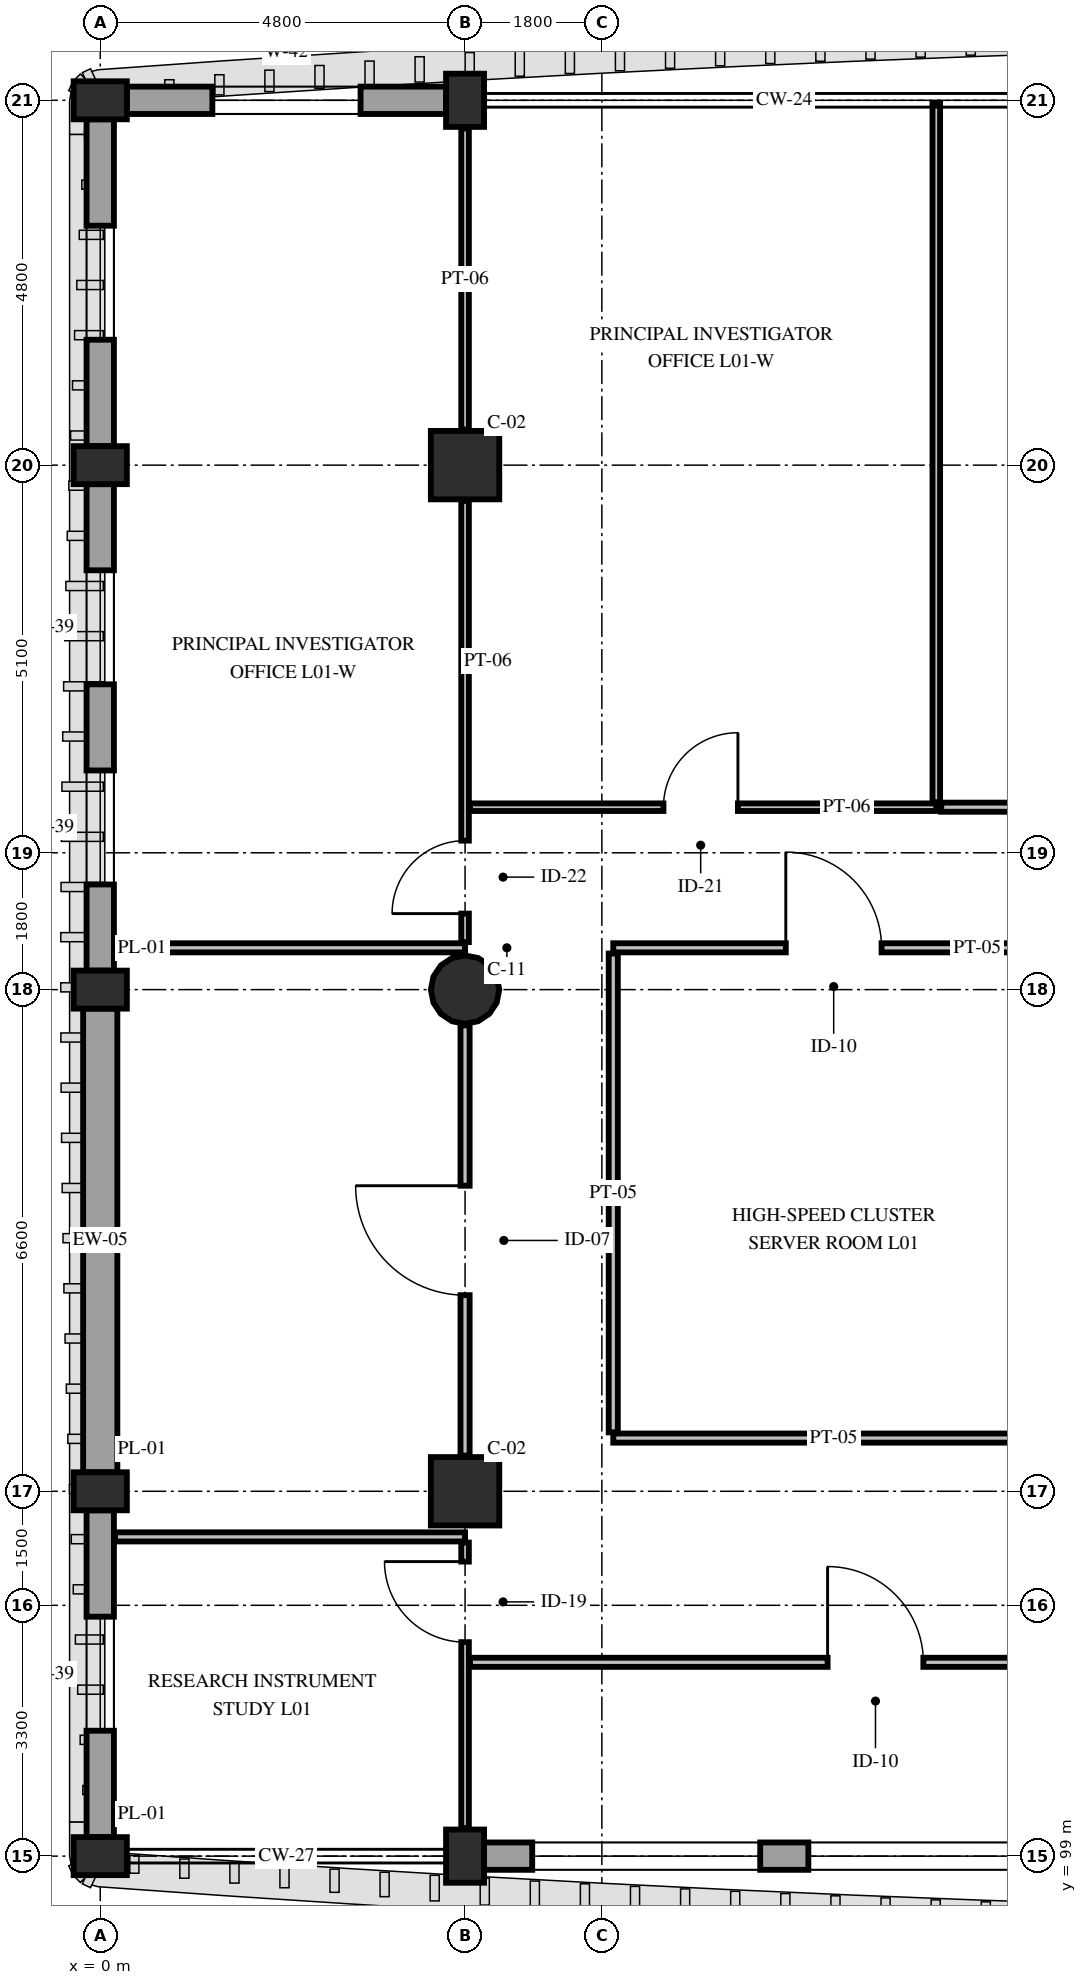
"""IFC4 building model, lengths in metres.
Left out: names, types, materials, properties, quantities, classifications, styles, units other than length and angle.
Written with IfcOpenShell. Run it as: python <this file> out.ifc"""

import sys

from ifc_helpers import new_model, si_unit, direction, frame, frame_2d, origin, origin_2d, place, context, subcontext, project, spatial, rectangle, circle, extrude, element, fill, save


model = new_model("IFC4")
c1 = context("Model", 3, precision=1e-05, world=origin(), true_north=direction((0.0, 1.0)))
c2 = subcontext(c1, "Body", "Model", "MODEL_VIEW")
j1 = project(units=[si_unit("LENGTHUNIT", "METRE"), si_unit("PLANEANGLEUNIT", "RADIAN")], contexts=[c1])
p1 = place(None, origin())
s1 = spatial("IfcSite", under=j1, at=p1, CompositionType="ELEMENT")
p2 = place(p1, origin())
s2 = spatial("IfcBuilding", under=s1, at=p2, CompositionType="ELEMENT")
p3 = place(p2, frame((0.0, 0.0, 5.4)))
s3 = spatial("IfcBuildingStorey", under=s2, at=p3, CompositionType="ELEMENT", Elevation=5.4)
for number, where, z_axis, x_axis in (
    (1, (0.0, 99.0, 0.0), (0.0, 0.0, 1.0), (0.0, 1.0, 0.0)),
    (2, (0.0, 103.8, 0.0), (0.0, 0.0, 1.0), (0.0, 1.0, 0.0)),
    (3, (0.0, 110.4, 0.0), (0.0, 0.0, 1.0), (0.0, 1.0, 0.0)),
    (4, (0.0, 117.3, 0.0), (0.0, 0.0, 1.0), (0.0, 1.0, 0.0)),
    (5, (0.0, 122.1, 0.0), (0.0, 0.0, 1.0), (0.0, 1.0, 0.0)),
    (6, (4.8, 99.0, 0.0), (0.0, 0.0, 1.0), (1.0, 0.0, 0.0)),
):
    element("IfcColumn", number, at=place(p3, frame(where, z_axis=z_axis, x_axis=x_axis)), inside=s3, PredefinedType="PILASTER", context=c2, shape_type="SweptSolid", body=[
        extrude(rectangle(XDim=0.5, YDim=0.7, at=origin_2d()), origin(), (0.0, 0.0, 1.0), 4.8),
    ])
p4 = place(p3, frame((4.8, 103.8, 0.0), z_axis=(0.0, 0.0, 1.0), x_axis=(1.0, 0.0, 0.0)))
e7 = element("IfcColumn", 7, at=p4, inside=s3, PredefinedType="COLUMN", context=c2, shape_type="SweptSolid", body=[
    extrude(rectangle(XDim=0.9, YDim=0.9, at=origin_2d()), origin(), (0.0, 0.0, 1.0), 4.8),
])
p5 = place(p3, frame((4.8, 110.4, 0.0), z_axis=(0.0, 0.0, 1.0), x_axis=(1.0, 0.0, 0.0)))
e8 = element("IfcColumn", 8, at=p5, inside=s3, PredefinedType="COLUMN", context=c2, shape_type="SweptSolid", body=[
    extrude(circle(Radius=0.45, at=origin_2d()), origin(), (0.0, 0.0, 1.0), 4.8),
])
p6 = place(p3, frame((4.8, 117.3, 0.0), z_axis=(0.0, 0.0, 1.0), x_axis=(1.0, 0.0, 0.0)))
e9 = element("IfcColumn", 9, at=p6, inside=s3, PredefinedType="COLUMN", context=c2, shape_type="SweptSolid", body=[
    extrude(rectangle(XDim=0.9, YDim=0.9, at=origin_2d()), origin(), (0.0, 0.0, 1.0), 4.8),
])
p7 = place(p3, frame((4.8, 122.1, 0.0), z_axis=(0.0, 0.0, 1.0), x_axis=(1.0, 0.0, 0.0)))
e10 = element("IfcColumn", 10, at=p7, inside=s3, PredefinedType="PILASTER", context=c2, shape_type="SweptSolid", body=[
    extrude(rectangle(XDim=0.5, YDim=0.7, at=origin_2d()), origin(), (0.0, 0.0, 1.0), 4.8),
])
p8 = place(p3, frame((0.0, 99.25, 0.0), z_axis=(0.0, 0.0, 1.0), x_axis=(0.0, 1.0, 0.0)))
e11 = element("IfcWall", 11, at=p8, inside=s3, PredefinedType="STANDARD", context=c2, shape_type="SweptSolid", body=[
    extrude(rectangle(XDim=4.3, YDim=0.36, at=frame_2d((2.15, 0.0))), origin(), (0.0, 0.0, 1.0), 3.95),
])
p9 = place(p8, frame((1.4, 0.0, 0.85)))
e12 = element("IfcOpeningElement", 12, at=p9, cuts=e11, PredefinedType="OPENING", context=c2, shape_type="SweptSolid", body=[
    extrude(rectangle(XDim=1.5, YDim=2.08, at=frame_2d((0.75, 1.04))), frame((0.0, 0.195, 0.0), z_axis=(0.0, -1.0, 0.0), x_axis=(1.0, 0.0, 0.0)), (0.0, 0.0, 1.0), 0.39),
])
p10 = place(p3, frame((0.0, 104.05, 0.0), z_axis=(0.0, 0.0, 1.0), x_axis=(0.0, 1.0, 0.0)))
e13 = element("IfcWall", 13, at=p10, inside=s3, PredefinedType="SOLIDWALL", context=c2, shape_type="SweptSolid", body=[
    extrude(rectangle(XDim=6.1, YDim=0.45, at=frame_2d((3.05, 0.0))), origin(), (0.0, 0.0, 1.0), 3.95),
])
p11 = place(p3, frame((0.0, 110.65, 0.0), z_axis=(0.0, 0.0, 1.0), x_axis=(0.0, 1.0, 0.0)))
e14 = element("IfcWall", 14, at=p11, inside=s3, PredefinedType="STANDARD", context=c2, shape_type="SweptSolid", body=[
    extrude(rectangle(XDim=6.4, YDim=0.36, at=frame_2d((3.2, 0.0))), origin(), (0.0, 0.0, 1.0), 3.95),
])
p12 = place(p11, frame((1.133, 0.0, 0.85)))
e15 = element("IfcOpeningElement", 15, at=p12, cuts=e14, PredefinedType="OPENING", context=c2, shape_type="SweptSolid", body=[
    extrude(rectangle(XDim=1.5, YDim=2.08, at=frame_2d((0.75, 1.04))), frame((0.0, 0.195, 0.0), z_axis=(0.0, -1.0, 0.0), x_axis=(1.0, 0.0, 0.0)), (0.0, 0.0, 1.0), 0.39),
])
p13 = place(p11, frame((3.767, 0.0, 0.85)))
e16 = element("IfcOpeningElement", 16, at=p13, cuts=e14, PredefinedType="OPENING", context=c2, shape_type="SweptSolid", body=[
    extrude(rectangle(XDim=1.5, YDim=2.08, at=frame_2d((0.75, 1.04))), frame((0.0, 0.195, 0.0), z_axis=(0.0, -1.0, 0.0), x_axis=(1.0, 0.0, 0.0)), (0.0, 0.0, 1.0), 0.39),
])
p14 = place(p3, frame((0.0, 117.55, 0.0), z_axis=(0.0, 0.0, 1.0), x_axis=(0.0, 1.0, 0.0)))
e17 = element("IfcWall", 17, at=p14, inside=s3, PredefinedType="STANDARD", context=c2, shape_type="SweptSolid", body=[
    extrude(rectangle(XDim=4.3, YDim=0.36, at=frame_2d((2.15, 0.0))), origin(), (0.0, 0.0, 1.0), 3.95),
])
p15 = place(p14, frame((1.4, 0.0, 0.85)))
e18 = element("IfcOpeningElement", 18, at=p15, cuts=e17, PredefinedType="OPENING", context=c2, shape_type="SweptSolid", body=[
    extrude(rectangle(XDim=1.5, YDim=2.08, at=frame_2d((0.75, 1.04))), frame((0.0, 0.195, 0.0), z_axis=(0.0, -1.0, 0.0), x_axis=(1.0, 0.0, 0.0)), (0.0, 0.0, 1.0), 0.39),
])
p16 = place(p3, frame((0.35, 122.1, 0.0), z_axis=(0.0, 0.0, 1.0), x_axis=(1.0, 0.0, 0.0)))
e19 = element("IfcWall", 19, at=p16, inside=s3, PredefinedType="STANDARD", context=c2, shape_type="SweptSolid", body=[
    extrude(rectangle(XDim=4.2, YDim=0.36, at=frame_2d((2.1, 0.0))), origin(), (0.0, 0.0, 1.0), 3.95),
])
p17 = place(p16, frame((1.125, 0.0, 0.85)))
e20 = element("IfcOpeningElement", 20, at=p17, cuts=e19, PredefinedType="OPENING", context=c2, shape_type="SweptSolid", body=[
    extrude(rectangle(XDim=1.95, YDim=2.24, at=frame_2d((0.975, 1.12))), frame((0.0, 0.195, 0.0), z_axis=(0.0, -1.0, 0.0), x_axis=(1.0, 0.0, 0.0)), (0.0, 0.0, 1.0), 0.39),
])
p18 = place(p3, frame((12.95, 99.0, 0.0), z_axis=(0.0, 0.0, 1.0), x_axis=(-1.0, 0.0, 0.0)))
e21 = element("IfcWall", 21, at=p18, inside=s3, PredefinedType="STANDARD", context=c2, shape_type="SweptSolid", body=[
    extrude(rectangle(XDim=7.9, YDim=0.36, at=frame_2d((3.95, 0.0))), origin(), (0.0, 0.0, 1.0), 3.93),
])
p19 = place(p18, frame((0.633, 0.0, 0.85)))
e22 = element("IfcOpeningElement", 22, at=p19, cuts=e21, PredefinedType="OPENING", context=c2, shape_type="SweptSolid", body=[
    extrude(rectangle(XDim=3.0, YDim=2.08, at=frame_2d((1.5, 1.04))), frame((0.0, 0.195, 0.0), z_axis=(0.0, -1.0, 0.0), x_axis=(1.0, 0.0, 0.0)), (0.0, 0.0, 1.0), 0.39),
])
p20 = place(p18, frame((4.267, 0.0, 0.85)))
e23 = element("IfcOpeningElement", 23, at=p20, cuts=e21, PredefinedType="OPENING", context=c2, shape_type="SweptSolid", body=[
    extrude(rectangle(XDim=3.0, YDim=2.08, at=frame_2d((1.5, 1.04))), frame((0.0, 0.195, 0.0), z_axis=(0.0, -1.0, 0.0), x_axis=(1.0, 0.0, 0.0)), (0.0, 0.0, 1.0), 0.39),
])
p21 = place(p3, frame((6.75, 104.5, 0.0), z_axis=(0.0, 0.0, 1.0), x_axis=(1.0, 0.0, 0.0)))
e24 = element("IfcWall", 24, at=p21, inside=s3, PredefinedType="PARTITIONING", context=c2, shape_type="SweptSolid", body=[
    extrude(rectangle(XDim=5.8, YDim=0.12, at=frame_2d((2.9, 0.0))), origin(), (0.0, 0.0, 1.0), 4.295),
])
p22 = place(p3, frame((6.75, 110.95, 0.0), z_axis=(0.0, 0.0, 1.0), x_axis=(1.0, 0.0, 0.0)))
e25 = element("IfcWall", 25, at=p22, inside=s3, PredefinedType="PARTITIONING", context=c2, shape_type="SweptSolid", body=[
    extrude(rectangle(XDim=5.8, YDim=0.12, at=frame_2d((2.9, 0.0))), origin(), (0.0, 0.0, 1.0), 4.295),
])
p23 = place(p22, frame((2.27, 0.0, 0.0)))
e26 = element("IfcOpeningElement", 26, at=p23, cuts=e25, PredefinedType="OPENING", context=c2, shape_type="SweptSolid", body=[
    extrude(rectangle(XDim=1.26, YDim=2.2, at=frame_2d((0.63, 1.1))), frame((0.0, 0.075, 0.0), z_axis=(0.0, -1.0, 0.0), x_axis=(1.0, 0.0, 0.0)), (0.0, 0.0, 1.0), 0.15),
])
p24 = place(p3, frame((6.75, 104.575, 0.0), z_axis=(0.0, 0.0, 1.0), x_axis=(0.0, 1.0, 0.0)))
e27 = element("IfcWall", 27, at=p24, inside=s3, PredefinedType="PARTITIONING", context=c2, shape_type="SweptSolid", body=[
    extrude(rectangle(XDim=6.3, YDim=0.12, at=frame_2d((3.15, 0.0))), origin(), (0.0, 0.0, 1.0), 3.83),
])
for number, where, z_axis, x_axis in (
    (28, (0.195, 103.2, 0.0), (0.0, 0.0, 1.0), (1.0, 0.0, 0.0)),
    (29, (0.195, 110.95, 0.0), (0.0, 0.0, 1.0), (1.0, 0.0, 0.0)),
):
    element("IfcWall", number, at=place(p3, frame(where, z_axis=z_axis, x_axis=x_axis)), inside=s3, PredefinedType="PARTITIONING", context=c2, shape_type="SweptSolid", body=[
        extrude(rectangle(XDim=4.605, YDim=0.12, at=frame_2d((2.302, 0.0))), origin(), (0.0, 0.0, 1.0), 4.08),
    ])
p25 = place(p3, frame((4.8, 104.27, 0.0), z_axis=(0.0, 0.0, 1.0), x_axis=(0.0, 1.0, 0.0)))
e30 = element("IfcWall", 30, at=p25, inside=s3, PredefinedType="PARTITIONING", context=c2, shape_type="SweptSolid", body=[
    extrude(rectangle(XDim=5.66, YDim=0.12, at=frame_2d((2.83, 0.0))), origin(), (0.0, 0.0, 1.0), 4.13),
])
p26 = place(p25, frame((2.11, 0.0, 0.0)))
e31 = element("IfcOpeningElement", 31, at=p26, cuts=e30, PredefinedType="OPENING", context=c2, shape_type="SweptSolid", body=[
    extrude(rectangle(XDim=1.44, YDim=2.25, at=frame_2d((0.72, 1.125))), frame((0.0, 0.075, 0.0), z_axis=(0.0, -1.0, 0.0), x_axis=(1.0, 0.0, 0.0)), (0.0, 0.0, 1.0), 0.15),
])
p27 = place(p3, frame((4.8, 111.025, 0.0), z_axis=(0.0, 0.0, 1.0), x_axis=(0.0, 1.0, 0.0)))
e32 = element("IfcWall", 32, at=p27, inside=s3, PredefinedType="PARTITIONING", context=c2, shape_type="SweptSolid", body=[
    extrude(rectangle(XDim=5.805, YDim=0.1, at=frame_2d((2.903, 0.0))), origin(), (0.0, 0.0, 1.0), 4.13),
])
p28 = place(p27, frame((0.375, 0.0, 0.0)))
e33 = element("IfcOpeningElement", 33, at=p28, cuts=e32, PredefinedType="OPENING", context=c2, shape_type="SweptSolid", body=[
    extrude(rectangle(XDim=0.96, YDim=2.15, at=frame_2d((0.48, 1.075))), frame((0.0, 0.065, 0.0), z_axis=(0.0, -1.0, 0.0), x_axis=(1.0, 0.0, 0.0)), (0.0, 0.0, 1.0), 0.13),
])
p29 = place(p3, frame((4.8, 117.77, 0.0), z_axis=(0.0, 0.0, 1.0), x_axis=(0.0, 1.0, 0.0)))
e34 = element("IfcWall", 34, at=p29, inside=s3, PredefinedType="PARTITIONING", context=c2, shape_type="SweptSolid", body=[
    extrude(rectangle(XDim=3.96, YDim=0.1, at=frame_2d((1.98, 0.0))), origin(), (0.0, 0.0, 1.0), 4.13),
])
p30 = place(p3, frame((4.865, 112.8, 0.0), z_axis=(0.0, 0.0, 1.0), x_axis=(1.0, 0.0, 0.0)))
e35 = element("IfcWall", 35, at=p30, inside=s3, PredefinedType="PARTITIONING", context=c2, shape_type="SweptSolid", body=[
    extrude(rectangle(XDim=6.135, YDim=0.1, at=frame_2d((3.067, 0.0))), origin(), (0.0, 0.0, 1.0), 4.13),
])
p31 = place(p30, frame((2.545, 0.0, 0.0)))
e36 = element("IfcOpeningElement", 36, at=p31, cuts=e35, PredefinedType="OPENING", context=c2, shape_type="SweptSolid", body=[
    extrude(rectangle(XDim=0.98, YDim=2.2, at=frame_2d((0.49, 1.1))), frame((0.0, 0.065, 0.0), z_axis=(0.0, -1.0, 0.0), x_axis=(1.0, 0.0, 0.0)), (0.0, 0.0, 1.0), 0.13),
])
p32 = place(p3, frame((11.0, 112.865, 0.0), z_axis=(0.0, 0.0, 1.0), x_axis=(0.0, 1.0, 0.0)))
e37 = element("IfcWall", 37, at=p32, inside=s3, PredefinedType="PARTITIONING", context=c2, shape_type="SweptSolid", body=[
    extrude(rectangle(XDim=9.195, YDim=0.1, at=frame_2d((4.598, 0.0))), origin(), (0.0, 0.0, 1.0), 3.83),
])
p33 = place(p3, frame((11.065, 112.8, 0.0), z_axis=(0.0, 0.0, 1.0), x_axis=(1.0, 0.0, 0.0)))
e38 = element("IfcWall", 38, at=p33, inside=s3, PredefinedType="PARTITIONING", context=c2, shape_type="SweptSolid", body=[
    extrude(rectangle(XDim=12.035, YDim=0.12, at=frame_2d((6.018, 0.0))), origin(), (0.0, 0.0, 1.0), 4.13),
])
p34 = place(p33, frame((5.355, 0.0, 0.0)))
e39 = element("IfcOpeningElement", 39, at=p34, cuts=e38, PredefinedType="OPENING", context=c2, shape_type="SweptSolid", body=[
    extrude(rectangle(XDim=1.26, YDim=2.2, at=frame_2d((0.63, 1.1))), frame((0.0, 0.075, 0.0), z_axis=(0.0, -1.0, 0.0), x_axis=(1.0, 0.0, 0.0)), (0.0, 0.0, 1.0), 0.15),
])
p35 = place(p3, frame((4.8, 99.37, 0.0), z_axis=(0.0, 0.0, 1.0), x_axis=(0.0, 1.0, 0.0)))
e40 = element("IfcWall", 40, at=p35, inside=s3, PredefinedType="PARTITIONING", context=c2, shape_type="SweptSolid", body=[
    extrude(rectangle(XDim=3.755, YDim=0.1, at=frame_2d((1.877, 0.0))), origin(), (0.0, 0.0, 1.0), 4.13),
])
p36 = place(p35, frame((2.445, 0.0, 0.0)))
e41 = element("IfcOpeningElement", 41, at=p36, cuts=e40, PredefinedType="OPENING", context=c2, shape_type="SweptSolid", body=[
    extrude(rectangle(XDim=1.06, YDim=2.2, at=frame_2d((0.53, 1.1))), frame((0.0, 0.065, 0.0), z_axis=(0.0, -1.0, 0.0), x_axis=(1.0, 0.0, 0.0)), (0.0, 0.0, 1.0), 0.13),
])
p37 = place(p3, frame((4.865, 101.55, 0.0), z_axis=(0.0, 0.0, 1.0), x_axis=(1.0, 0.0, 0.0)))
e42 = element("IfcWall", 42, at=p37, inside=s3, PredefinedType="PARTITIONING", context=c2, shape_type="SweptSolid", body=[
    extrude(rectangle(XDim=10.735, YDim=0.12, at=frame_2d((5.368, 0.0))), origin(), (0.0, 0.0, 1.0), 4.13),
])
p38 = place(p37, frame((4.705, 0.0, 0.0)))
e43 = element("IfcOpeningElement", 43, at=p38, cuts=e42, PredefinedType="OPENING", context=c2, shape_type="SweptSolid", body=[
    extrude(rectangle(XDim=1.26, YDim=2.2, at=frame_2d((0.63, 1.1))), frame((0.0, 0.075, 0.0), z_axis=(0.0, -1.0, 0.0), x_axis=(1.0, 0.0, 0.0)), (0.0, 0.0, 1.0), 0.15),
])
p39 = place(p9, origin())
e44 = element("IfcWindow", 44, at=p39, inside=s3, PartitioningType="SINGLE_PANEL", PredefinedType="WINDOW", context=c2, shape_type="SweptSolid", body=[
    extrude(rectangle(XDim=1.5, YDim=2.08, at=frame_2d((0.75, 1.04))), frame((0.0, 0.03, 0.0), z_axis=(0.0, -1.0, 0.0), x_axis=(1.0, 0.0, 0.0)), (0.0, 0.0, 1.0), 0.06),
])
fill(e12, e44)
p40 = place(p12, origin())
e45 = element("IfcWindow", 45, at=p40, inside=s3, PartitioningType="SINGLE_PANEL", PredefinedType="WINDOW", context=c2, shape_type="SweptSolid", body=[
    extrude(rectangle(XDim=1.5, YDim=2.08, at=frame_2d((0.75, 1.04))), frame((0.0, 0.03, 0.0), z_axis=(0.0, -1.0, 0.0), x_axis=(1.0, 0.0, 0.0)), (0.0, 0.0, 1.0), 0.06),
])
fill(e15, e45)
p41 = place(p13, origin())
e46 = element("IfcWindow", 46, at=p41, inside=s3, PartitioningType="SINGLE_PANEL", PredefinedType="WINDOW", context=c2, shape_type="SweptSolid", body=[
    extrude(rectangle(XDim=1.5, YDim=2.08, at=frame_2d((0.75, 1.04))), frame((0.0, 0.03, 0.0), z_axis=(0.0, -1.0, 0.0), x_axis=(1.0, 0.0, 0.0)), (0.0, 0.0, 1.0), 0.06),
])
fill(e16, e46)
p42 = place(p15, origin())
e47 = element("IfcWindow", 47, at=p42, inside=s3, PartitioningType="SINGLE_PANEL", PredefinedType="WINDOW", context=c2, shape_type="SweptSolid", body=[
    extrude(rectangle(XDim=1.5, YDim=2.08, at=frame_2d((0.75, 1.04))), frame((0.0, 0.03, 0.0), z_axis=(0.0, -1.0, 0.0), x_axis=(1.0, 0.0, 0.0)), (0.0, 0.0, 1.0), 0.06),
])
fill(e18, e47)
p43 = place(p17, origin())
e48 = element("IfcWindow", 48, at=p43, inside=s3, PartitioningType="DOUBLE_PANEL_VERTICAL", PredefinedType="WINDOW", context=c2, shape_type="SweptSolid", body=[
    extrude(rectangle(XDim=1.95, YDim=2.24, at=frame_2d((0.975, 1.12))), frame((0.0, 0.03, 0.0), z_axis=(0.0, -1.0, 0.0), x_axis=(1.0, 0.0, 0.0)), (0.0, 0.0, 1.0), 0.06),
])
fill(e20, e48)
p44 = place(p19, origin())
e49 = element("IfcWindow", 49, at=p44, inside=s3, PartitioningType="DOUBLE_PANEL_VERTICAL", PredefinedType="WINDOW", context=c2, shape_type="SweptSolid", body=[
    extrude(rectangle(XDim=3.0, YDim=2.08, at=frame_2d((1.5, 1.04))), frame((0.0, 0.03, 0.0), z_axis=(0.0, -1.0, 0.0), x_axis=(1.0, 0.0, 0.0)), (0.0, 0.0, 1.0), 0.06),
])
fill(e22, e49)
p45 = place(p20, origin())
e50 = element("IfcWindow", 50, at=p45, inside=s3, PartitioningType="DOUBLE_PANEL_VERTICAL", PredefinedType="WINDOW", context=c2, shape_type="SweptSolid", body=[
    extrude(rectangle(XDim=3.0, YDim=2.08, at=frame_2d((1.5, 1.04))), frame((0.0, 0.03, 0.0), z_axis=(0.0, -1.0, 0.0), x_axis=(1.0, 0.0, 0.0)), (0.0, 0.0, 1.0), 0.06),
])
fill(e23, e50)
p46 = place(p23, origin())
e51 = element("IfcDoor", 51, at=p46, inside=s3, OperationType="SINGLE_SWING_LEFT", PredefinedType="DOOR", context=c2, shape_type="SweptSolid", body=[
    extrude(rectangle(XDim=1.26, YDim=2.2, at=frame_2d((0.63, 1.1))), frame((0.0, 0.025, 0.0), z_axis=(0.0, -1.0, 0.0), x_axis=(1.0, 0.0, 0.0)), (0.0, 0.0, 1.0), 0.05),
])
fill(e26, e51)
p47 = place(p26, origin())
e52 = element("IfcDoor", 52, at=p47, inside=s3, OperationType="SINGLE_SWING_RIGHT", PredefinedType="DOOR", context=c2, shape_type="SweptSolid", body=[
    extrude(rectangle(XDim=1.44, YDim=2.25, at=frame_2d((0.72, 1.125))), frame((0.0, 0.025, 0.0), z_axis=(0.0, -1.0, 0.0), x_axis=(1.0, 0.0, 0.0)), (0.0, 0.0, 1.0), 0.05),
])
fill(e31, e52)
p48 = place(p28, origin())
e53 = element("IfcDoor", 53, at=p48, inside=s3, OperationType="SINGLE_SWING_LEFT", PredefinedType="DOOR", context=c2, shape_type="SweptSolid", body=[
    extrude(rectangle(XDim=0.96, YDim=2.15, at=frame_2d((0.48, 1.075))), frame((0.0, 0.025, 0.0), z_axis=(0.0, -1.0, 0.0), x_axis=(1.0, 0.0, 0.0)), (0.0, 0.0, 1.0), 0.05),
])
fill(e33, e53)
p49 = place(p31, origin())
e54 = element("IfcDoor", 54, at=p49, inside=s3, OperationType="SINGLE_SWING_RIGHT", PredefinedType="DOOR", context=c2, shape_type="SweptSolid", body=[
    extrude(rectangle(XDim=0.98, YDim=2.2, at=frame_2d((0.49, 1.1))), frame((0.0, 0.025, 0.0), z_axis=(0.0, -1.0, 0.0), x_axis=(1.0, 0.0, 0.0)), (0.0, 0.0, 1.0), 0.05),
])
fill(e36, e54)
p50 = place(p36, origin())
e55 = element("IfcDoor", 55, at=p50, inside=s3, OperationType="SINGLE_SWING_RIGHT", PredefinedType="DOOR", context=c2, shape_type="SweptSolid", body=[
    extrude(rectangle(XDim=1.06, YDim=2.2, at=frame_2d((0.53, 1.1))), frame((0.0, 0.025, 0.0), z_axis=(0.0, -1.0, 0.0), x_axis=(1.0, 0.0, 0.0)), (0.0, 0.0, 1.0), 0.05),
])
fill(e41, e55)
p51 = place(p38, origin())
e56 = element("IfcDoor", 56, at=p51, inside=s3, OperationType="SINGLE_SWING_LEFT", PredefinedType="DOOR", context=c2, shape_type="SweptSolid", body=[
    extrude(rectangle(XDim=1.26, YDim=2.2, at=frame_2d((0.63, 1.1))), frame((0.0, 0.025, 0.0), z_axis=(0.0, -1.0, 0.0), x_axis=(1.0, 0.0, 0.0)), (0.0, 0.0, 1.0), 0.05),
])
fill(e43, e56)
save(model, sys.argv[1])
